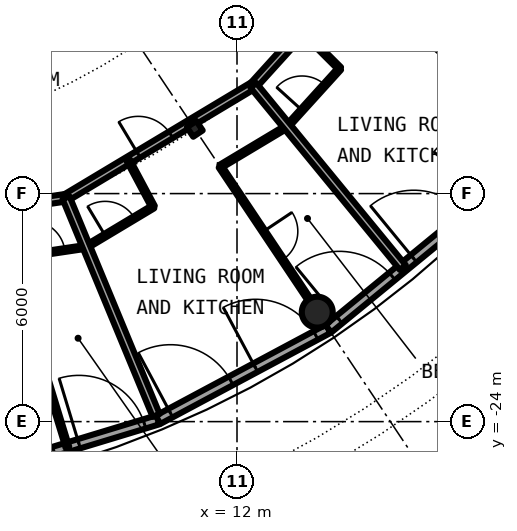
"""IFC4 building model, lengths in metres.
Left out: names, types, materials, properties, quantities, classifications, styles, units other than length and angle.
Written with IfcOpenShell. Run it as: python <this file> out.ifc"""

import sys

from ifc_helpers import new_model, si_unit, direction, frame, frame_2d, origin, origin_2d, place, context, subcontext, project, spatial, rectangle, hollow_circle, i_section, extrude, element, fill, save


model = new_model("IFC4")
c1 = context("Model", 3, precision=1e-05, world=origin(), true_north=direction((0.0, 1.0)))
c2 = subcontext(c1, "Body", "Model", "MODEL_VIEW")
j1 = project(units=[si_unit("LENGTHUNIT", "METRE"), si_unit("PLANEANGLEUNIT", "RADIAN")], contexts=[c1])
p1 = place(None, origin())
s1 = spatial("IfcSite", under=j1, at=p1, CompositionType="ELEMENT")
p2 = place(p1, origin())
s2 = spatial("IfcBuilding", under=s1, at=p2, CompositionType="ELEMENT")
p3 = place(p2, frame((0.0, 0.0, 237.1)))
s3 = spatial("IfcBuildingStorey", under=s2, at=p3, CompositionType="ELEMENT", Elevation=237.1)
p4 = place(p3, frame((14.112, -21.119, 0.0), z_axis=(0.0, 0.0, 1.0), x_axis=(1.0, 0.0, 0.0)))
e1 = element("IfcColumn", 1, at=p4, inside=s3, PredefinedType="COLUMN", context=c2, shape_type="SweptSolid", body=[
    extrude(hollow_circle(Radius=0.406, WallThickness=0.03, at=origin_2d()), origin(), (0.0, 0.0, 1.0), 3.05),
])
p5 = place(p3, frame((10.889, -16.297, 0.0), z_axis=(0.0, 0.0, 1.0), x_axis=(0.55557023302, -0.831469612303, 0.0)))
e2 = element("IfcColumn", 2, at=p5, inside=s3, PredefinedType="COLUMN", context=c2, shape_type="SweptSolid", body=[
    extrude(i_section(OverallWidth=0.3, OverallDepth=0.3, WebThickness=0.011, FlangeThickness=0.019, FilletRadius=0.027, at=origin_2d()), origin(), (0.0, 0.0, 1.0), 3.05),
])
p6 = place(p3, frame((5.058, -25.427, 0.0), z_axis=(0.0, 0.0, 1.0), x_axis=(0.956941126395, 0.290282070774, 0.0)))
e3 = element("IfcWall", 3, at=p6, inside=s3, PredefinedType="SOLIDWALL", context=c2, shape_type="SweptSolid", body=[
    extrude(rectangle(XDim=5.082, YDim=0.25, at=frame_2d((2.541, 0.0))), origin(), (0.0, 0.0, 1.0), 2.7),
])
p7 = place(p6, frame((0.42, 0.0, 0.0)))
e4 = element("IfcOpeningElement", 4, at=p7, cuts=e3, PredefinedType="OPENING", context=c2, shape_type="SweptSolid", body=[
    extrude(rectangle(XDim=1.8, YDim=2.2, at=frame_2d((0.9, 1.1))), frame((0.0, 0.135, 0.0), z_axis=(0.0, -1.0, 0.0), x_axis=(1.0, 0.0, 0.0)), (0.0, 0.0, 1.0), 0.27),
])
p8 = place(p6, frame((2.909, 0.0, 0.0)))
e5 = element("IfcOpeningElement", 5, at=p8, cuts=e3, PredefinedType="OPENING", context=c2, shape_type="SweptSolid", body=[
    extrude(rectangle(XDim=1.8, YDim=2.2, at=frame_2d((0.9, 1.1))), frame((0.0, 0.135, 0.0), z_axis=(0.0, -1.0, 0.0), x_axis=(1.0, 0.0, 0.0)), (0.0, 0.0, 1.0), 0.27),
])
p9 = place(p3, frame((9.921, -23.952, 0.0), z_axis=(0.0, 0.0, 1.0), x_axis=(0.881903089468, 0.47143073806, 0.0)))
e6 = element("IfcWall", 6, at=p9, inside=s3, PredefinedType="SOLIDWALL", context=c2, shape_type="SweptSolid", body=[
    extrude(rectangle(XDim=5.082, YDim=0.25, at=frame_2d((2.541, 0.0))), origin(), (0.0, 0.0, 1.0), 2.7),
])
p10 = place(p9, frame((0.374, 0.0, 0.0)))
e7 = element("IfcOpeningElement", 7, at=p10, cuts=e6, PredefinedType="OPENING", context=c2, shape_type="SweptSolid", body=[
    extrude(rectangle(XDim=1.8, YDim=2.2, at=frame_2d((0.9, 1.1))), frame((0.0, 0.135, 0.0), z_axis=(0.0, -1.0, 0.0), x_axis=(1.0, 0.0, 0.0)), (0.0, 0.0, 1.0), 0.27),
])
p11 = place(p9, frame((2.909, 0.0, 0.0)))
e8 = element("IfcOpeningElement", 8, at=p11, cuts=e6, PredefinedType="OPENING", context=c2, shape_type="SweptSolid", body=[
    extrude(rectangle(XDim=1.8, YDim=2.2, at=frame_2d((0.9, 1.1))), frame((0.0, 0.135, 0.0), z_axis=(0.0, -1.0, 0.0), x_axis=(1.0, 0.0, 0.0)), (0.0, 0.0, 1.0), 0.27),
])
p12 = place(p3, frame((14.403, -21.556, 0.0), z_axis=(0.0, 0.0, 1.0), x_axis=(0.77306189429, 0.63433059803, 0.0)))
e9 = element("IfcWall", 9, at=p12, inside=s3, PredefinedType="SOLIDWALL", context=c2, shape_type="SweptSolid", body=[
    extrude(rectangle(XDim=5.082, YDim=0.25, at=frame_2d((2.541, 0.0))), origin(), (0.0, 0.0, 1.0), 2.7),
])
p13 = place(p12, frame((0.374, 0.0, 0.0)))
e10 = element("IfcOpeningElement", 10, at=p13, cuts=e9, PredefinedType="OPENING", context=c2, shape_type="SweptSolid", body=[
    extrude(rectangle(XDim=1.8, YDim=2.2, at=frame_2d((0.9, 1.1))), frame((0.0, 0.135, 0.0), z_axis=(0.0, -1.0, 0.0), x_axis=(1.0, 0.0, 0.0)), (0.0, 0.0, 1.0), 0.27),
])
p14 = place(p12, frame((2.909, 0.0, 0.0)))
e11 = element("IfcOpeningElement", 11, at=p14, cuts=e9, PredefinedType="OPENING", context=c2, shape_type="SweptSolid", body=[
    extrude(rectangle(XDim=1.8, YDim=2.2, at=frame_2d((0.9, 1.1))), frame((0.0, 0.135, 0.0), z_axis=(0.0, -1.0, 0.0), x_axis=(1.0, 0.0, 0.0)), (0.0, 0.0, 1.0), 0.27),
])
p15 = place(p3, frame((8.036, -19.401, 0.0), z_axis=(0.0, 0.0, 1.0), x_axis=(0.857796869978, 0.513988842152, 0.0)))
e12 = element("IfcWall", 12, at=p15, inside=s3, PredefinedType="PARTITIONING", context=c2, shape_type="SweptSolid", body=[
    extrude(rectangle(XDim=2.054, YDim=0.1, at=frame_2d((1.027, 0.0))), origin(), (0.0, 0.0, 1.0), 2.7),
])
p16 = place(p15, frame((0.577, 0.0, 0.0)))
e13 = element("IfcOpeningElement", 13, at=p16, cuts=e12, PredefinedType="OPENING", context=c2, shape_type="SweptSolid", body=[
    extrude(rectangle(XDim=0.9, YDim=2.3, at=frame_2d((0.45, 1.15))), frame((0.0, 0.06, 0.0), z_axis=(0.0, -1.0, 0.0), x_axis=(1.0, 0.0, 0.0)), (0.0, 0.0, 1.0), 0.12),
])
p17 = place(p3, frame((11.56, -17.289, 0.0), z_axis=(0.0, 0.0, 1.0), x_axis=(0.857713062192, 0.514128683254, 0.0)))
e14 = element("IfcWall", 14, at=p17, inside=s3, PredefinedType="PARTITIONING", context=c2, shape_type="SweptSolid", body=[
    extrude(rectangle(XDim=2.054, YDim=0.1, at=frame_2d((1.027, 0.0))), origin(), (0.0, 0.0, 1.0), 2.7),
])
p18 = place(p3, frame((13.322, -16.233, 0.0), z_axis=(0.0, 0.0, 1.0), x_axis=(0.671678456097, 0.74084279818, 0.0)))
e15 = element("IfcWall", 15, at=p18, inside=s3, PredefinedType="PARTITIONING", context=c2, shape_type="SweptSolid", body=[
    extrude(rectangle(XDim=2.054, YDim=0.1, at=frame_2d((1.027, 0.0))), origin(), (0.0, 0.0, 1.0), 2.7),
])
p19 = place(p18, frame((0.577, 0.0, 0.0)))
e16 = element("IfcOpeningElement", 16, at=p19, cuts=e15, PredefinedType="OPENING", context=c2, shape_type="SweptSolid", body=[
    extrude(rectangle(XDim=0.9, YDim=2.3, at=frame_2d((0.45, 1.15))), frame((0.0, 0.06, 0.0), z_axis=(0.0, -1.0, 0.0), x_axis=(1.0, 0.0, 0.0)), (0.0, 0.0, 1.0), 0.12),
])
p20 = place(p3, frame((1.976, -20.301, 0.0), z_axis=(0.0, 0.0, 1.0), x_axis=(0.989146687273, 0.146931382135, 0.0)))
e17 = element("IfcWall", 17, at=p20, inside=s3, PredefinedType="PARTITIONING", context=c2, shape_type="SweptSolid", body=[
    extrude(rectangle(XDim=6.126, YDim=0.1, at=frame_2d((3.063, 0.0))), origin(), (0.0, 0.0, 1.0), 2.7),
])
p21 = place(p20, frame((2.618, 0.0, 0.0)))
e18 = element("IfcOpeningElement", 18, at=p21, cuts=e17, PredefinedType="OPENING", context=c2, shape_type="SweptSolid", body=[
    extrude(rectangle(XDim=0.9, YDim=2.3, at=frame_2d((0.45, 1.15))), frame((0.0, 0.06, 0.0), z_axis=(0.0, -1.0, 0.0), x_axis=(1.0, 0.0, 0.0)), (0.0, 0.0, 1.0), 0.12),
])
p22 = place(p20, frame((4.654, 0.0, 0.0)))
e19 = element("IfcOpeningElement", 19, at=p22, cuts=e17, PredefinedType="OPENING", context=c2, shape_type="SweptSolid", body=[
    extrude(rectangle(XDim=0.9, YDim=2.3, at=frame_2d((0.45, 1.15))), frame((0.0, 0.06, 0.0), z_axis=(0.0, -1.0, 0.0), x_axis=(1.0, 0.0, 0.0)), (0.0, 0.0, 1.0), 0.12),
])
p23 = place(p3, frame((7.495, -18.111, 0.0), z_axis=(0.0, 0.0, 1.0), x_axis=(0.85773600187, 0.514090411403, 0.0)))
e20 = element("IfcWall", 20, at=p23, inside=s3, PredefinedType="PARTITIONING", context=c2, shape_type="SweptSolid", body=[
    extrude(rectangle(XDim=5.758, YDim=0.2, at=frame_2d((2.879, 0.0))), origin(), (0.0, 0.0, 1.0), 2.45),
])
p24 = place(p23, frame((2.224, 0.0, 0.0)))
e21 = element("IfcOpeningElement", 21, at=p24, cuts=e20, PredefinedType="OPENING", context=c2, shape_type="SweptSolid", body=[
    extrude(rectangle(XDim=1.0, YDim=2.3, at=frame_2d((0.5, 1.15))), frame((0.0, 0.11, 0.0), z_axis=(0.0, -1.0, 0.0), x_axis=(1.0, 0.0, 0.0)), (0.0, 0.0, 1.0), 0.22),
])
p25 = place(p3, frame((12.434, -15.151, 0.0), z_axis=(0.0, 0.0, 1.0), x_axis=(0.671619657805, 0.740896102871, 0.0)))
e22 = element("IfcWall", 22, at=p25, inside=s3, PredefinedType="PARTITIONING", context=c2, shape_type="SweptSolid", body=[
    extrude(rectangle(XDim=5.6, YDim=0.2, at=frame_2d((2.8, 0.0))), origin(), (0.0, 0.0, 1.0), 2.45),
])
p26 = place(p25, frame((3.335, 0.0, 0.0)))
e23 = element("IfcOpeningElement", 23, at=p26, cuts=e22, PredefinedType="OPENING", context=c2, shape_type="SweptSolid", body=[
    extrude(rectangle(XDim=1.0, YDim=2.3, at=frame_2d((0.5, 1.15))), frame((0.0, 0.11, 0.0), z_axis=(0.0, -1.0, 0.0), x_axis=(1.0, 0.0, 0.0)), (0.0, 0.0, 1.0), 0.22),
])
p27 = place(p3, frame((-1.927, -19.506, 0.0), z_axis=(0.0, 0.0, 1.0), x_axis=(0.989181308547, 0.146698121399, 0.0)))
e24 = element("IfcWall", 24, at=p27, inside=s3, PredefinedType="PARTITIONING", context=c2, shape_type="SweptSolid", body=[
    extrude(rectangle(XDim=9.531, YDim=0.2, at=frame_2d((4.766, 0.0))), origin(), (0.0, 0.0, 1.0), 2.45),
])
p28 = place(p27, frame((5.811, 0.0, 0.0)))
e25 = element("IfcOpeningElement", 25, at=p28, cuts=e24, PredefinedType="OPENING", context=c2, shape_type="SweptSolid", body=[
    extrude(rectangle(XDim=1.0, YDim=2.3, at=frame_2d((0.5, 1.15))), frame((0.0, 0.11, 0.0), z_axis=(0.0, -1.0, 0.0), x_axis=(1.0, 0.0, 0.0)), (0.0, 0.0, 1.0), 0.22),
])
p29 = place(p3, frame((4.354, -14.354, 0.0), z_axis=(0.0, 0.0, 1.0), x_axis=(0.80331688802, 0.595551825974, 0.0)))
e26 = element("IfcWall", 26, at=p29, inside=s3, PredefinedType="PARTITIONING", context=c2, shape_type="SweptSolid", body=[
    extrude(rectangle(XDim=8.659, YDim=0.2, at=frame_2d((4.33, 0.0))), origin(), (0.0, 0.0, 1.0), 2.7),
])
p30 = place(p29, frame((3.832, 0.0, 0.0)))
e27 = element("IfcOpeningElement", 27, at=p30, cuts=e26, PredefinedType="OPENING", context=c2, shape_type="SweptSolid", body=[
    extrude(rectangle(XDim=1.0, YDim=2.3, at=frame_2d((0.5, 1.15))), frame((0.0, 0.11, 0.0), z_axis=(0.0, -1.0, 0.0), x_axis=(1.0, 0.0, 0.0)), (0.0, 0.0, 1.0), 0.22),
])
p31 = place(p3, frame((6.017, -19.701, 0.0), z_axis=(0.0, 0.0, 1.0), x_axis=(0.292244771208, -0.956343554222, 0.0)))
e28 = element("IfcWall", 28, at=p31, inside=s3, PredefinedType="PARTITIONING", context=c2, shape_type="SweptSolid", body=[
    extrude(rectangle(XDim=5.201, YDim=0.1, at=frame_2d((2.601, 0.0))), origin(), (0.0, 0.0, 1.0), 2.7),
])
p32 = place(p3, frame((7.501, -18.108, 0.0), z_axis=(0.0, 0.0, 1.0), x_axis=(0.382606842458, -0.92391125337, 0.0)))
e29 = element("IfcWall", 29, at=p32, inside=s3, PredefinedType="PARTITIONING", context=c2, shape_type="SweptSolid", body=[
    extrude(rectangle(XDim=6.2, YDim=0.2, at=frame_2d((3.1, 0.0))), origin(), (0.0, 0.0, 1.0), 2.7),
])
p33 = place(p3, frame((9.14, -17.124, 0.0), z_axis=(0.0, 0.0, 1.0), x_axis=(0.471072596947, -0.882094444153, 0.0)))
e30 = element("IfcWall", 30, at=p33, inside=s3, PredefinedType="PARTITIONING", context=c2, shape_type="SweptSolid", body=[
    extrude(rectangle(XDim=1.386, YDim=0.1, at=frame_2d((0.693, 0.0))), origin(), (0.0, 0.0, 1.0), 2.7),
])
p34 = place(p3, frame((11.56, -17.289, 0.0), z_axis=(0.0, 0.0, 1.0), x_axis=(0.555959489687, -0.831209387475, 0.0)))
e31 = element("IfcWall", 31, at=p34, inside=s3, PredefinedType="PARTITIONING", context=c2, shape_type="SweptSolid", body=[
    extrude(rectangle(XDim=4.203, YDim=0.1, at=frame_2d((2.102, 0.0))), origin(), (0.0, 0.0, 1.0), 2.7),
])
p35 = place(p34, frame((2.051, 0.0, 0.0)))
e32 = element("IfcOpeningElement", 32, at=p35, cuts=e31, PredefinedType="OPENING", context=c2, shape_type="SweptSolid", body=[
    extrude(rectangle(XDim=0.9, YDim=2.3, at=frame_2d((0.45, 1.15))), frame((0.0, 0.06, 0.0), z_axis=(0.0, -1.0, 0.0), x_axis=(1.0, 0.0, 0.0)), (0.0, 0.0, 1.0), 0.12),
])
p36 = place(p3, frame((12.432, -15.153, 0.0), z_axis=(0.0, 0.0, 1.0), x_axis=(0.634356436091, -0.773040692324, 0.0)))
e33 = element("IfcWall", 33, at=p36, inside=s3, PredefinedType="PARTITIONING", context=c2, shape_type="SweptSolid", body=[
    extrude(rectangle(XDim=6.2, YDim=0.2, at=frame_2d((3.1, 0.0))), origin(), (0.0, 0.0, 1.0), 2.7),
])
p37 = place(p3, frame((13.722, -13.73, 0.0), z_axis=(0.0, 0.0, 1.0), x_axis=(0.707458838269, -0.706754548733, 0.0)))
e34 = element("IfcWall", 34, at=p37, inside=s3, PredefinedType="PARTITIONING", context=c2, shape_type="SweptSolid", body=[
    extrude(rectangle(XDim=1.386, YDim=0.1, at=frame_2d((0.693, 0.0))), origin(), (0.0, 0.0, 1.0), 2.7),
])
p38 = place(p3, frame((16.081, -13.189, 0.0), z_axis=(0.0, 0.0, 1.0), x_axis=(0.773226150619, -0.634130365145, 0.0)))
e35 = element("IfcWall", 35, at=p38, inside=s3, PredefinedType="PARTITIONING", context=c2, shape_type="SweptSolid", body=[
    extrude(rectangle(XDim=5.002, YDim=0.1, at=frame_2d((2.501, 0.0))), origin(), (0.0, 0.0, 1.0), 2.7),
])
p39 = place(p38, frame((2.051, 0.0, 0.0)))
e36 = element("IfcOpeningElement", 36, at=p39, cuts=e35, PredefinedType="OPENING", context=c2, shape_type="SweptSolid", body=[
    extrude(rectangle(XDim=0.9, YDim=2.3, at=frame_2d((0.45, 1.15))), frame((0.0, 0.06, 0.0), z_axis=(0.0, -1.0, 0.0), x_axis=(1.0, 0.0, 0.0)), (0.0, 0.0, 1.0), 0.12),
])
p40 = place(p7, origin())
e37 = element("IfcDoor", 37, at=p40, inside=s3, OperationType="SINGLE_SWING_LEFT", PredefinedType="DOOR", context=c2, shape_type="SweptSolid", body=[
    extrude(rectangle(XDim=1.8, YDim=2.2, at=frame_2d((0.9, 1.1))), frame((0.0, 0.025, 0.0), z_axis=(0.0, -1.0, 0.0), x_axis=(1.0, 0.0, 0.0)), (0.0, 0.0, 1.0), 0.05),
])
fill(e4, e37)
p41 = place(p8, origin())
e38 = element("IfcDoor", 38, at=p41, inside=s3, OperationType="SINGLE_SWING_LEFT", PredefinedType="DOOR", context=c2, shape_type="SweptSolid", body=[
    extrude(rectangle(XDim=1.8, YDim=2.2, at=frame_2d((0.9, 1.1))), frame((0.0, 0.025, 0.0), z_axis=(0.0, -1.0, 0.0), x_axis=(1.0, 0.0, 0.0)), (0.0, 0.0, 1.0), 0.05),
])
fill(e5, e38)
p42 = place(p10, origin())
e39 = element("IfcDoor", 39, at=p42, inside=s3, OperationType="SINGLE_SWING_LEFT", PredefinedType="DOOR", context=c2, shape_type="SweptSolid", body=[
    extrude(rectangle(XDim=1.8, YDim=2.2, at=frame_2d((0.9, 1.1))), frame((0.0, 0.025, 0.0), z_axis=(0.0, -1.0, 0.0), x_axis=(1.0, 0.0, 0.0)), (0.0, 0.0, 1.0), 0.05),
])
fill(e7, e39)
p43 = place(p11, origin())
e40 = element("IfcDoor", 40, at=p43, inside=s3, OperationType="SINGLE_SWING_LEFT", PredefinedType="DOOR", context=c2, shape_type="SweptSolid", body=[
    extrude(rectangle(XDim=1.8, YDim=2.2, at=frame_2d((0.9, 1.1))), frame((0.0, 0.025, 0.0), z_axis=(0.0, -1.0, 0.0), x_axis=(1.0, 0.0, 0.0)), (0.0, 0.0, 1.0), 0.05),
])
fill(e8, e40)
p44 = place(p13, origin())
e41 = element("IfcDoor", 41, at=p44, inside=s3, OperationType="SINGLE_SWING_LEFT", PredefinedType="DOOR", context=c2, shape_type="SweptSolid", body=[
    extrude(rectangle(XDim=1.8, YDim=2.2, at=frame_2d((0.9, 1.1))), frame((0.0, 0.025, 0.0), z_axis=(0.0, -1.0, 0.0), x_axis=(1.0, 0.0, 0.0)), (0.0, 0.0, 1.0), 0.05),
])
fill(e10, e41)
p45 = place(p14, origin())
e42 = element("IfcDoor", 42, at=p45, inside=s3, OperationType="SINGLE_SWING_LEFT", PredefinedType="DOOR", context=c2, shape_type="SweptSolid", body=[
    extrude(rectangle(XDim=1.8, YDim=2.2, at=frame_2d((0.9, 1.1))), frame((0.0, 0.025, 0.0), z_axis=(0.0, -1.0, 0.0), x_axis=(1.0, 0.0, 0.0)), (0.0, 0.0, 1.0), 0.05),
])
fill(e11, e42)
p46 = place(p22, origin())
e43 = element("IfcDoor", 43, at=p46, inside=s3, OperationType="SINGLE_SWING_RIGHT", PredefinedType="DOOR", context=c2, shape_type="SweptSolid", body=[
    extrude(rectangle(XDim=0.9, YDim=2.3, at=frame_2d((0.45, 1.15))), frame((0.0, 0.025, 0.0), z_axis=(0.0, -1.0, 0.0), x_axis=(1.0, 0.0, 0.0)), (0.0, 0.0, 1.0), 0.05),
])
fill(e19, e43)
p47 = place(p24, origin())
e44 = element("IfcDoor", 44, at=p47, inside=s3, OperationType="SINGLE_SWING_LEFT", PredefinedType="DOOR", context=c2, shape_type="SweptSolid", body=[
    extrude(rectangle(XDim=1.0, YDim=2.3, at=frame_2d((0.5, 1.15))), frame((0.0, 0.025, 0.0), z_axis=(0.0, -1.0, 0.0), x_axis=(1.0, 0.0, 0.0)), (0.0, 0.0, 1.0), 0.05),
])
fill(e21, e44)
p48 = place(p16, origin())
e45 = element("IfcDoor", 45, at=p48, inside=s3, OperationType="SINGLE_SWING_LEFT", PredefinedType="DOOR", context=c2, shape_type="SweptSolid", body=[
    extrude(rectangle(XDim=0.9, YDim=2.3, at=frame_2d((0.45, 1.15))), frame((0.0, 0.025, 0.0), z_axis=(0.0, -1.0, 0.0), x_axis=(1.0, 0.0, 0.0)), (0.0, 0.0, 1.0), 0.05),
])
fill(e13, e45)
p49 = place(p35, origin())
e46 = element("IfcDoor", 46, at=p49, inside=s3, OperationType="SINGLE_SWING_RIGHT", PredefinedType="DOOR", context=c2, shape_type="SweptSolid", body=[
    extrude(rectangle(XDim=0.9, YDim=2.3, at=frame_2d((0.45, 1.15))), frame((0.0, 0.025, 0.0), z_axis=(0.0, -1.0, 0.0), x_axis=(1.0, 0.0, 0.0)), (0.0, 0.0, 1.0), 0.05),
])
fill(e32, e46)
p50 = place(p19, origin())
e47 = element("IfcDoor", 47, at=p50, inside=s3, OperationType="SINGLE_SWING_LEFT", PredefinedType="DOOR", context=c2, shape_type="SweptSolid", body=[
    extrude(rectangle(XDim=0.9, YDim=2.3, at=frame_2d((0.45, 1.15))), frame((0.0, 0.025, 0.0), z_axis=(0.0, -1.0, 0.0), x_axis=(1.0, 0.0, 0.0)), (0.0, 0.0, 1.0), 0.05),
])
fill(e16, e47)
save(model, sys.argv[1])
